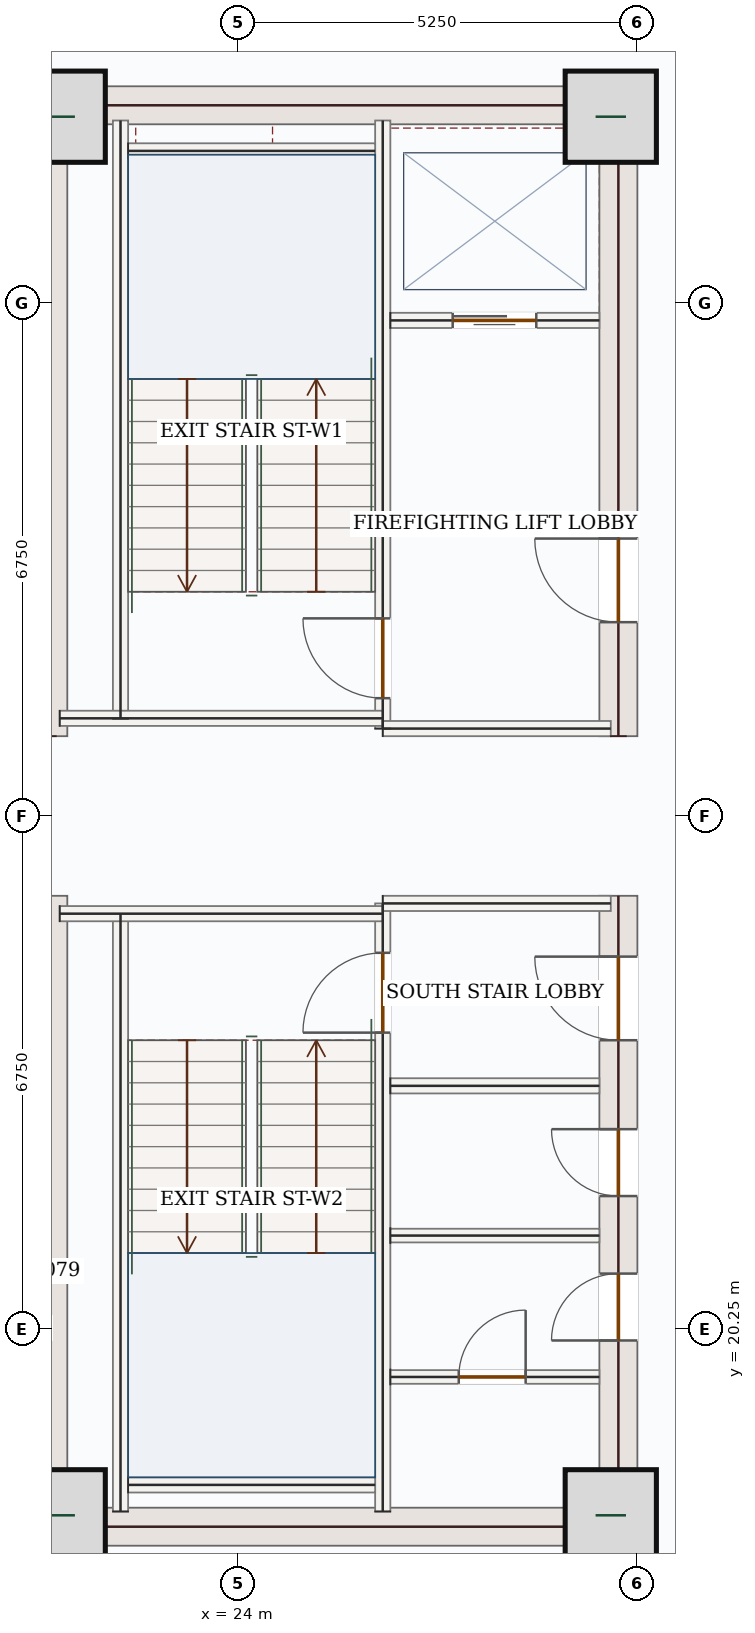
"""IFC4 building model, lengths in metres.
Left out: names, types, materials, properties, quantities, classifications, styles, units other than length and angle.
Written with IfcOpenShell. Run it as: python <this file> out.ifc"""

import sys

from ifc_helpers import new_model, si_unit, direction, frame, frame_2d, origin, origin_2d, place, context, subcontext, project, spatial, rectangle, extrude, source, transform, mapped, element, fill, save


model = new_model("IFC4")
c1 = context("Model", 3, precision=1e-05, world=origin(), true_north=direction((0.0, 1.0)))
c2 = subcontext(c1, "Body", "Model", "MODEL_VIEW")
j1 = project(units=[si_unit("LENGTHUNIT", "METRE"), si_unit("PLANEANGLEUNIT", "RADIAN")], contexts=[c1])
p1 = place(None, origin())
s1 = spatial("IfcSite", under=j1, at=p1, CompositionType="ELEMENT")
p2 = place(p1, origin())
s2 = spatial("IfcBuilding", under=s1, at=p2, CompositionType="ELEMENT")
p3 = place(p2, frame((0.0, 0.0, 205.8)))
s3 = spatial("IfcBuildingStorey", under=s2, at=p3, CompositionType="ELEMENT", Elevation=205.8)
m1 = source(origin(), c2, "Body", "SweptSolid", [
    extrude(rectangle(XDim=8.55, YDim=0.5, at=frame_2d((4.275, 0.0))), origin(), (0.0, 0.0, 1.0), 3.62),
])
for number, where, z_axis, x_axis in (
    (1, (21.5, 17.4, 0.0), (0.0, 0.0, 1.0), (0.0, 1.0, 0.0)),
    (2, (21.5, 28.05, 0.0), (0.0, 0.0, 1.0), (0.0, 1.0, 0.0)),
):
    element("IfcWall", number, at=place(p3, frame(where, z_axis=z_axis, x_axis=x_axis)), inside=s3, PredefinedType="SHEAR", context=c2, shape_type="MappedRepresentation", body=[
        mapped(m1, transform((0.0, 0.0, 0.0), x_axis=(1.0, 0.0, 0.0), y_axis=(0.0, 1.0, 0.0), z_axis=(0.0, 0.0, 1.0), scale=1.0)),
    ])
p4 = place(p3, frame((29.0, 17.4, 0.0), z_axis=(0.0, 0.0, 1.0), x_axis=(0.0, 1.0, 0.0)))
e3 = element("IfcWall", 3, at=p4, inside=s3, PredefinedType="SHEAR", context=c2, shape_type="SweptSolid", body=[
    extrude(rectangle(XDim=8.55, YDim=0.5, at=frame_2d((4.275, 0.0))), origin(), (0.0, 0.0, 1.0), 3.62),
])
p5 = place(p4, frame((6.65, 0.0, 0.0)))
e4 = element("IfcOpeningElement", 4, at=p5, cuts=e3, PredefinedType="OPENING", context=c2, shape_type="SweptSolid", body=[
    extrude(rectangle(XDim=1.1, YDim=2.2, at=frame_2d((0.55, 1.1))), frame((0.0, 0.26, 0.0), z_axis=(0.0, -1.0, 0.0), x_axis=(1.0, 0.0, 0.0)), (0.0, 0.0, 1.0), 0.52),
])
p6 = place(p4, frame((2.7, 0.0, 0.0)))
e5 = element("IfcOpeningElement", 5, at=p6, cuts=e3, PredefinedType="OPENING", context=c2, shape_type="SweptSolid", body=[
    extrude(rectangle(XDim=0.88, YDim=2.1, at=frame_2d((0.44, 1.05))), frame((0.0, 0.26, 0.0), z_axis=(0.0, -1.0, 0.0), x_axis=(1.0, 0.0, 0.0)), (0.0, 0.0, 1.0), 0.52),
])
p7 = place(p4, frame((4.6, 0.0, 0.0)))
e6 = element("IfcOpeningElement", 6, at=p7, cuts=e3, PredefinedType="OPENING", context=c2, shape_type="SweptSolid", body=[
    extrude(rectangle(XDim=0.88, YDim=2.1, at=frame_2d((0.44, 1.05))), frame((0.0, 0.26, 0.0), z_axis=(0.0, -1.0, 0.0), x_axis=(1.0, 0.0, 0.0)), (0.0, 0.0, 1.0), 0.52),
])
p8 = place(p3, frame((29.0, 28.05, 0.0), z_axis=(0.0, 0.0, 1.0), x_axis=(0.0, 1.0, 0.0)))
e7 = element("IfcWall", 7, at=p8, inside=s3, PredefinedType="SHEAR", context=c2, shape_type="SweptSolid", body=[
    extrude(rectangle(XDim=8.55, YDim=0.5, at=frame_2d((4.275, 0.0))), origin(), (0.0, 0.0, 1.0), 3.62),
])
p9 = place(p8, frame((1.5, 0.0, 0.0)))
e8 = element("IfcOpeningElement", 8, at=p9, cuts=e7, PredefinedType="OPENING", context=c2, shape_type="SweptSolid", body=[
    extrude(rectangle(XDim=1.1, YDim=2.2, at=frame_2d((0.55, 1.1))), frame((0.0, 0.26, 0.0), z_axis=(0.0, -1.0, 0.0), x_axis=(1.0, 0.0, 0.0)), (0.0, 0.0, 1.0), 0.52),
])
m2 = source(origin(), c2, "Body", "SweptSolid", [
    extrude(rectangle(XDim=7.0, YDim=0.5, at=frame_2d((3.5, 0.0))), origin(), (0.0, 0.0, 1.0), 3.62),
])
for number, where, z_axis, x_axis in (
    (9, (21.75, 17.65, 0.0), (0.0, 0.0, 1.0), (1.0, 0.0, 0.0)),
    (10, (21.75, 36.35, 0.0), (0.0, 0.0, 1.0), (1.0, 0.0, 0.0)),
):
    element("IfcWall", number, at=place(p3, frame(where, z_axis=z_axis, x_axis=x_axis)), inside=s3, PredefinedType="SHEAR", context=c2, shape_type="MappedRepresentation", body=[
        mapped(m2, transform((0.0, 0.0, 0.0), x_axis=(1.0, 0.0, 0.0), y_axis=(0.0, 1.0, 0.0), z_axis=(0.0, 0.0, 1.0), scale=1.0)),
    ])
m3 = source(origin(), c2, "Body", "SweptSolid", [
    extrude(rectangle(XDim=1.2, YDim=1.2, at=origin_2d()), origin(), (0.0, 0.0, 1.0), 3.9),
])
for number, where, z_axis, x_axis in (
    (11, (21.65, 17.8, 0.0), (0.0, 0.0, 1.0), (1.0, 0.0, 0.0)),
    (12, (28.9, 17.8, 0.0), (0.0, 0.0, 1.0), (1.0, 0.0, 0.0)),
    (13, (21.65, 36.2, 0.0), (0.0, 0.0, 1.0), (1.0, 0.0, 0.0)),
    (14, (28.9, 36.2, 0.0), (0.0, 0.0, 1.0), (1.0, 0.0, 0.0)),
):
    element("IfcColumn", number, at=place(p3, frame(where, z_axis=z_axis, x_axis=x_axis)), inside=s3, PredefinedType="COLUMN", context=c2, shape_type="MappedRepresentation", body=[
        mapped(m3, transform((0.0, 0.0, 0.0), x_axis=(1.0, 0.0, 0.0), y_axis=(0.0, 1.0, 0.0), z_axis=(0.0, 0.0, 1.0), scale=1.0)),
    ])
p10 = place(p3, frame((18.94, 35.542, 0.0), z_axis=(0.0, 0.0, 1.0), x_axis=(0.707106781187, 0.707106781187, 0.0)))
e15 = element("IfcWall", 15, at=p10, inside=s3, PredefinedType="SOLIDWALL", context=c2, shape_type="SweptSolid", body=[
    extrude(rectangle(XDim=5.258, YDim=0.28, at=frame_2d((2.629, 0.0))), origin(), (0.0, 0.0, 1.0), 3.62),
])
p11 = place(p10, frame((1.729, 0.0, 0.85)))
e16 = element("IfcOpeningElement", 16, at=p11, cuts=e15, PredefinedType="OPENING", context=c2, shape_type="SweptSolid", body=[
    extrude(rectangle(XDim=1.8, YDim=1.75, at=frame_2d((0.9, 0.875))), frame((0.0, 0.15, 0.0), z_axis=(0.0, -1.0, 0.0), x_axis=(1.0, 0.0, 0.0)), (0.0, 0.0, 1.0), 0.3),
])
m4 = source(origin(), c2, "Body", "SweptSolid", [
    extrude(rectangle(XDim=7.87, YDim=0.2, at=frame_2d((3.935, 0.0))), origin(), (0.0, 0.0, 1.0), 3.62),
])
for number, where, z_axis, x_axis in (
    (17, (22.45, 17.85, 0.0), (0.0, 0.0, 1.0), (0.0, 1.0, 0.0)),
    (18, (22.45, 28.28, 0.0), (0.0, 0.0, 1.0), (0.0, 1.0, 0.0)),
):
    element("IfcWall", number, at=place(p3, frame(where, z_axis=z_axis, x_axis=x_axis)), inside=s3, PredefinedType="SOLIDWALL", context=c2, shape_type="MappedRepresentation", body=[
        mapped(m4, transform((0.0, 0.0, 0.0), x_axis=(1.0, 0.0, 0.0), y_axis=(0.0, 1.0, 0.0), z_axis=(0.0, 0.0, 1.0), scale=1.0)),
    ])
p12 = place(p3, frame((25.9, 17.85, 0.0), z_axis=(0.0, 0.0, 1.0), x_axis=(0.0, 1.0, 0.0)))
e19 = element("IfcWall", 19, at=p12, inside=s3, PredefinedType="SOLIDWALL", context=c2, shape_type="SweptSolid", body=[
    extrude(rectangle(XDim=8.0, YDim=0.2, at=frame_2d((4.0, 0.0))), origin(), (0.0, 0.0, 1.0), 3.62),
])
p13 = place(p12, frame((6.3, 0.0, 0.0)))
e20 = element("IfcOpeningElement", 20, at=p13, cuts=e19, PredefinedType="OPENING", context=c2, shape_type="SweptSolid", body=[
    extrude(rectangle(XDim=1.05, YDim=2.15, at=frame_2d((0.525, 1.075))), frame((0.0, 0.11, 0.0), z_axis=(0.0, -1.0, 0.0), x_axis=(1.0, 0.0, 0.0)), (0.0, 0.0, 1.0), 0.22),
])
p14 = place(p3, frame((25.9, 28.15, 0.0), z_axis=(0.0, 0.0, 1.0), x_axis=(0.0, 1.0, 0.0)))
e21 = element("IfcWall", 21, at=p14, inside=s3, PredefinedType="SOLIDWALL", context=c2, shape_type="SweptSolid", body=[
    extrude(rectangle(XDim=8.0, YDim=0.2, at=frame_2d((4.0, 0.0))), origin(), (0.0, 0.0, 1.0), 3.62),
])
p15 = place(p14, frame((0.4, 0.0, 0.0)))
e22 = element("IfcOpeningElement", 22, at=p15, cuts=e21, PredefinedType="OPENING", context=c2, shape_type="SweptSolid", body=[
    extrude(rectangle(XDim=1.05, YDim=2.15, at=frame_2d((0.525, 1.075))), frame((0.0, 0.11, 0.0), z_axis=(0.0, -1.0, 0.0), x_axis=(1.0, 0.0, 0.0)), (0.0, 0.0, 1.0), 0.22),
])
m5 = source(origin(), c2, "Body", "SweptSolid", [
    extrude(rectangle(XDim=4.25, YDim=0.2, at=frame_2d((2.125, 0.0))), origin(), (0.0, 0.0, 1.0), 3.62),
])
p16 = place(p3, frame((21.65, 25.715, 0.0), z_axis=(0.0, 0.0, 1.0), x_axis=(1.0, 0.0, 0.0)))
e23 = element("IfcWall", 23, at=p16, inside=s3, PredefinedType="SOLIDWALL", context=c2, shape_type="MappedRepresentation", body=[
    mapped(m5, transform((0.0, 0.0, 0.0), x_axis=(1.0, 0.0, 0.0), y_axis=(0.0, 1.0, 0.0), z_axis=(0.0, 0.0, 1.0), scale=1.0)),
])
m6 = source(origin(), c2, "Body", "SweptSolid", [
    extrude(rectangle(XDim=3.0, YDim=0.2, at=frame_2d((1.5, 0.0))), origin(), (0.0, 0.0, 1.0), 3.62),
])
p17 = place(p3, frame((25.9, 25.85, 0.0), z_axis=(0.0, 0.0, 1.0), x_axis=(1.0, 0.0, 0.0)))
e24 = element("IfcWall", 24, at=p17, inside=s3, PredefinedType="SOLIDWALL", context=c2, shape_type="MappedRepresentation", body=[
    mapped(m6, transform((0.0, 0.0, 0.0), x_axis=(1.0, 0.0, 0.0), y_axis=(0.0, 1.0, 0.0), z_axis=(0.0, 0.0, 1.0), scale=1.0)),
])
p18 = place(p3, frame((21.65, 28.285, 0.0), z_axis=(0.0, 0.0, 1.0), x_axis=(1.0, 0.0, 0.0)))
e25 = element("IfcWall", 25, at=p18, inside=s3, PredefinedType="SOLIDWALL", context=c2, shape_type="MappedRepresentation", body=[
    mapped(m5, transform((0.0, 0.0, 0.0), x_axis=(1.0, 0.0, 0.0), y_axis=(0.0, 1.0, 0.0), z_axis=(0.0, 0.0, 1.0), scale=1.0)),
])
p19 = place(p3, frame((25.9, 28.15, 0.0), z_axis=(0.0, 0.0, 1.0), x_axis=(1.0, 0.0, 0.0)))
e26 = element("IfcWall", 26, at=p19, inside=s3, PredefinedType="SOLIDWALL", context=c2, shape_type="MappedRepresentation", body=[
    mapped(m6, transform((0.0, 0.0, 0.0), x_axis=(1.0, 0.0, 0.0), y_axis=(0.0, 1.0, 0.0), z_axis=(0.0, 0.0, 1.0), scale=1.0)),
])
m7 = source(origin(), c2, "Body", "SweptSolid", [
    extrude(rectangle(XDim=3.25, YDim=0.2, at=frame_2d((1.625, 0.0))), origin(), (0.0, 0.0, 1.0), 3.62),
])
for number, where, z_axis, x_axis in (
    (27, (22.55, 35.75, 0.0), (0.0, 0.0, 1.0), (1.0, 0.0, 0.0)),
    (28, (22.55, 18.2, 0.0), (0.0, 0.0, 1.0), (1.0, 0.0, 0.0)),
):
    element("IfcWall", number, at=place(p3, frame(where, z_axis=z_axis, x_axis=x_axis)), inside=s3, PredefinedType="SOLIDWALL", context=c2, shape_type="MappedRepresentation", body=[
        mapped(m7, transform((0.0, 0.0, 0.0), x_axis=(1.0, 0.0, 0.0), y_axis=(0.0, 1.0, 0.0), z_axis=(0.0, 0.0, 1.0), scale=1.0)),
    ])
p20 = place(p3, frame((26.0, 33.52, 0.0), z_axis=(0.0, 0.0, 1.0), x_axis=(1.0, 0.0, 0.0)))
e29 = element("IfcWall", 29, at=p20, inside=s3, PredefinedType="SOLIDWALL", context=c2, shape_type="SweptSolid", body=[
    extrude(rectangle(XDim=2.75, YDim=0.2, at=frame_2d((1.375, 0.0))), origin(), (0.0, 0.0, 1.0), 3.62),
])
p21 = place(p20, frame((0.82, 0.0, 0.0)))
e30 = element("IfcOpeningElement", 30, at=p21, cuts=e29, PredefinedType="OPENING", context=c2, shape_type="SweptSolid", body=[
    extrude(rectangle(XDim=1.1, YDim=2.15, at=frame_2d((0.55, 1.075))), frame((0.0, 0.11, 0.0), z_axis=(0.0, -1.0, 0.0), x_axis=(1.0, 0.0, 0.0)), (0.0, 0.0, 1.0), 0.22),
])
m8 = source(origin(), c2, "Body", "SweptSolid", [
    extrude(rectangle(XDim=2.75, YDim=0.2, at=frame_2d((1.375, 0.0))), origin(), (0.0, 0.0, 1.0), 3.62),
])
p22 = place(p3, frame((26.0, 23.45, 0.0), z_axis=(0.0, 0.0, 1.0), x_axis=(1.0, 0.0, 0.0)))
e31 = element("IfcWall", 31, at=p22, inside=s3, PredefinedType="SOLIDWALL", context=c2, shape_type="MappedRepresentation", body=[
    mapped(m8, transform((0.0, 0.0, 0.0), x_axis=(1.0, 0.0, 0.0), y_axis=(0.0, 1.0, 0.0), z_axis=(0.0, 0.0, 1.0), scale=1.0)),
])
p23 = place(p3, frame((26.0, 19.62, 0.0), z_axis=(0.0, 0.0, 1.0), x_axis=(1.0, 0.0, 0.0)))
e32 = element("IfcWall", 32, at=p23, inside=s3, PredefinedType="PARTITIONING", context=c2, shape_type="SweptSolid", body=[
    extrude(rectangle(XDim=2.75, YDim=0.18, at=frame_2d((1.375, 0.0))), origin(), (0.0, 0.0, 1.0), 3.62),
])
p24 = place(p23, frame((0.9, 0.0, 0.0)))
e33 = element("IfcOpeningElement", 33, at=p24, cuts=e32, PredefinedType="OPENING", context=c2, shape_type="SweptSolid", body=[
    extrude(rectangle(XDim=0.88, YDim=2.1, at=frame_2d((0.44, 1.05))), frame((0.0, 0.1, 0.0), z_axis=(0.0, -1.0, 0.0), x_axis=(1.0, 0.0, 0.0)), (0.0, 0.0, 1.0), 0.2),
])
m9 = source(origin(), c2, "Body", "SweptSolid", [
    extrude(rectangle(XDim=2.75, YDim=0.18, at=frame_2d((1.375, 0.0))), origin(), (0.0, 0.0, 1.0), 3.62),
])
p25 = place(p3, frame((26.0, 21.48, 0.0), z_axis=(0.0, 0.0, 1.0), x_axis=(1.0, 0.0, 0.0)))
e34 = element("IfcWall", 34, at=p25, inside=s3, PredefinedType="PARTITIONING", context=c2, shape_type="MappedRepresentation", body=[
    mapped(m9, transform((0.0, 0.0, 0.0), x_axis=(1.0, 0.0, 0.0), y_axis=(0.0, 1.0, 0.0), z_axis=(0.0, 0.0, 1.0), scale=1.0)),
])
m10 = source(origin(), c2, "Body", "SweptSolid", [
    extrude(rectangle(XDim=1.05, YDim=2.15, at=frame_2d((0.525, 1.075))), frame((0.0, 0.025, 0.0), z_axis=(0.0, -1.0, 0.0), x_axis=(1.0, 0.0, 0.0)), (0.0, 0.0, 1.0), 0.05),
])
p26 = place(p15, origin())
e35 = element("IfcDoor", 35, at=p26, inside=s3, OperationType="SINGLE_SWING_RIGHT", PredefinedType="DOOR", context=c2, shape_type="MappedRepresentation", body=[
    mapped(m10, transform((0.0, 0.0, 0.0), x_axis=(1.0, 0.0, 0.0), y_axis=(0.0, 1.0, 0.0), z_axis=(0.0, 0.0, 1.0), scale=1.0)),
])
fill(e22, e35)
p27 = place(p13, origin())
e36 = element("IfcDoor", 36, at=p27, inside=s3, OperationType="SINGLE_SWING_LEFT", PredefinedType="DOOR", context=c2, shape_type="MappedRepresentation", body=[
    mapped(m10, transform((0.0, 0.0, 0.0), x_axis=(1.0, 0.0, 0.0), y_axis=(0.0, 1.0, 0.0), z_axis=(0.0, 0.0, 1.0), scale=1.0)),
])
fill(e20, e36)
m11 = source(origin(), c2, "Body", "SweptSolid", [
    extrude(rectangle(XDim=1.1, YDim=2.15, at=frame_2d((0.55, 1.075))), frame((0.0, 0.025, 0.0), z_axis=(0.0, -1.0, 0.0), x_axis=(1.0, 0.0, 0.0)), (0.0, 0.0, 1.0), 0.05),
])
p28 = place(p21, origin())
e37 = element("IfcDoor", 37, at=p28, inside=s3, OperationType="DOUBLE_DOOR_SLIDING", PredefinedType="DOOR", context=c2, shape_type="MappedRepresentation", body=[
    mapped(m11, transform((0.0, 0.0, 0.0), x_axis=(1.0, 0.0, 0.0), y_axis=(0.0, 1.0, 0.0), z_axis=(0.0, 0.0, 1.0), scale=1.0)),
])
fill(e30, e37)
m12 = source(origin(), c2, "Body", "SweptSolid", [
    extrude(rectangle(XDim=1.1, YDim=2.2, at=frame_2d((0.55, 1.1))), frame((0.0, 0.025, 0.0), z_axis=(0.0, -1.0, 0.0), x_axis=(1.0, 0.0, 0.0)), (0.0, 0.0, 1.0), 0.05),
])
p29 = place(p9, origin())
e38 = element("IfcDoor", 38, at=p29, inside=s3, OperationType="SINGLE_SWING_RIGHT", PredefinedType="DOOR", context=c2, shape_type="MappedRepresentation", body=[
    mapped(m12, transform((0.0, 0.0, 0.0), x_axis=(1.0, 0.0, 0.0), y_axis=(0.0, 1.0, 0.0), z_axis=(0.0, 0.0, 1.0), scale=1.0)),
])
fill(e8, e38)
p30 = place(p5, origin())
e39 = element("IfcDoor", 39, at=p30, inside=s3, OperationType="SINGLE_SWING_RIGHT", PredefinedType="DOOR", context=c2, shape_type="MappedRepresentation", body=[
    mapped(m12, transform((0.0, 0.0, 0.0), x_axis=(1.0, 0.0, 0.0), y_axis=(0.0, 1.0, 0.0), z_axis=(0.0, 0.0, 1.0), scale=1.0)),
])
fill(e4, e39)
m13 = source(origin(), c2, "Body", "SweptSolid", [
    extrude(rectangle(XDim=0.88, YDim=2.1, at=frame_2d((0.44, 1.05))), frame((0.0, 0.025, 0.0), z_axis=(0.0, -1.0, 0.0), x_axis=(1.0, 0.0, 0.0)), (0.0, 0.0, 1.0), 0.05),
])
p31 = place(p24, origin())
e40 = element("IfcDoor", 40, at=p31, inside=s3, OperationType="SINGLE_SWING_RIGHT", PredefinedType="DOOR", context=c2, shape_type="MappedRepresentation", body=[
    mapped(m13, transform((0.0, 0.0, 0.0), x_axis=(1.0, 0.0, 0.0), y_axis=(0.0, 1.0, 0.0), z_axis=(0.0, 0.0, 1.0), scale=1.0)),
])
fill(e33, e40)
p32 = place(p6, origin())
e41 = element("IfcDoor", 41, at=p32, inside=s3, OperationType="SINGLE_SWING_LEFT", PredefinedType="DOOR", context=c2, shape_type="MappedRepresentation", body=[
    mapped(m13, transform((0.0, 0.0, 0.0), x_axis=(1.0, 0.0, 0.0), y_axis=(0.0, 1.0, 0.0), z_axis=(0.0, 0.0, 1.0), scale=1.0)),
])
fill(e5, e41)
p33 = place(p7, origin())
e42 = element("IfcDoor", 42, at=p33, inside=s3, OperationType="SINGLE_SWING_RIGHT", PredefinedType="DOOR", context=c2, shape_type="MappedRepresentation", body=[
    mapped(m13, transform((0.0, 0.0, 0.0), x_axis=(1.0, 0.0, 0.0), y_axis=(0.0, 1.0, 0.0), z_axis=(0.0, 0.0, 1.0), scale=1.0)),
])
fill(e6, e42)
save(model, sys.argv[1])
